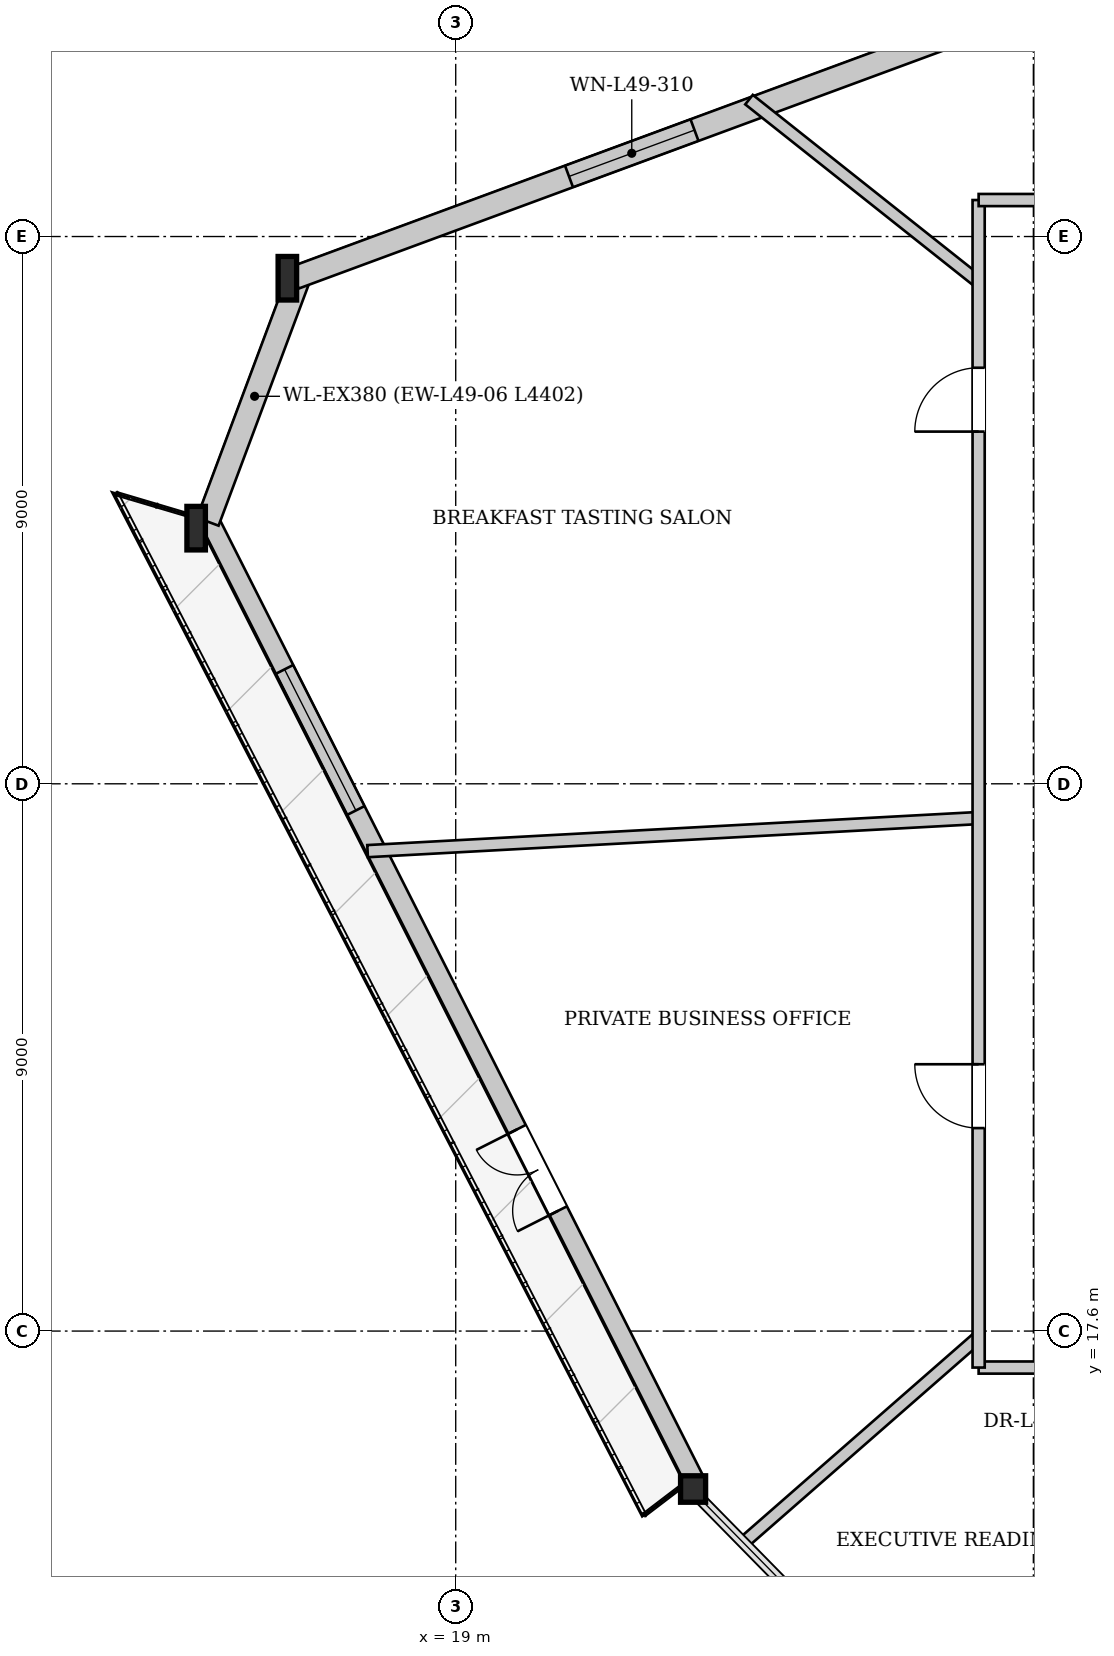
"""IFC4 building model, lengths in metres.
Left out: names, types, materials, properties, quantities, classifications, styles, units other than length and angle.
Written with IfcOpenShell. Run it as: python <this file> out.ifc"""

import sys

from ifc_helpers import new_model, si_unit, direction, frame, frame_2d, origin, origin_2d, place, context, subcontext, project, spatial, rectangle, i_section, extrude, source, transform, mapped, element, fill, save


model = new_model("IFC4")
c1 = context("Model", 3, precision=1e-05, world=origin(), true_north=direction((0.0, 1.0)))
c2 = subcontext(c1, "Body", "Model", "MODEL_VIEW")
j1 = project(units=[si_unit("LENGTHUNIT", "METRE"), si_unit("PLANEANGLEUNIT", "RADIAN")], contexts=[c1])
p1 = place(None, origin())
s1 = spatial("IfcSite", under=j1, at=p1, CompositionType="ELEMENT")
p2 = place(p1, origin())
s2 = spatial("IfcBuilding", under=s1, at=p2, CompositionType="ELEMENT")
p3 = place(p2, frame((0.0, 0.0, 185.65)))
s3 = spatial("IfcBuildingStorey", under=s2, at=p3, CompositionType="ELEMENT", Elevation=185.65)
m1 = source(origin(), c2, "Body", "SweptSolid", [
    extrude(i_section(OverallWidth=0.412, OverallDepth=0.435, WebThickness=0.031, FlangeThickness=0.05, at=origin_2d()), origin(), (0.0, 0.0, 1.0), 3.398),
])
p4 = place(p3, frame((26.94, 39.034, 0.0), z_axis=(-0.051951924281, -0.068694383973, 0.996284135763), x_axis=(0.797590801114, -0.603198900843, 0.0)))
e1 = element("IfcColumn", 1, at=p4, inside=s3, PredefinedType="COLUMN", context=c2, shape_type="MappedRepresentation", body=[
    mapped(m1, transform((0.0, 0.0, 0.0), x_axis=(1.0, 0.0, 0.0), y_axis=(0.0, 1.0, 0.0), z_axis=(0.0, 0.0, 1.0), scale=1.0)),
])
m2 = source(origin(), c2, "Body", "SweptSolid", [
    extrude(i_section(OverallWidth=0.304, OverallDepth=0.716, WebThickness=0.021, FlangeThickness=0.04, at=origin_2d()), origin(), (0.0, 0.0, 1.0), 3.407),
])
p5 = place(p3, frame((16.285, 35.101, 0.0), z_axis=(-0.031742425805, -0.109557943692, 0.993473439694), x_axis=(0.960498006582, -0.278286865216, 0.0)))
e2 = element("IfcColumn", 2, at=p5, inside=s3, PredefinedType="COLUMN", context=c2, shape_type="MappedRepresentation", body=[
    mapped(m2, transform((0.0, 0.0, 0.0), x_axis=(1.0, 0.0, 0.0), y_axis=(0.0, 1.0, 0.0), z_axis=(0.0, 0.0, 1.0), scale=1.0)),
])
m3 = source(origin(), c2, "Body", "SweptSolid", [
    extrude(i_section(OverallWidth=0.304, OverallDepth=0.716, WebThickness=0.021, FlangeThickness=0.04, at=origin_2d()), origin(), (0.0, 0.0, 1.0), 3.403),
])
p6 = place(p3, frame((14.744, 30.978, 0.0), z_axis=(-0.007461607315, -0.101951384567, 0.994761398327), x_axis=(0.997332477554, -0.072992665493, 0.0)))
e3 = element("IfcColumn", 3, at=p6, inside=s3, PredefinedType="COLUMN", context=c2, shape_type="MappedRepresentation", body=[
    mapped(m3, transform((0.0, 0.0, 0.0), x_axis=(1.0, 0.0, 0.0), y_axis=(0.0, 1.0, 0.0), z_axis=(0.0, 0.0, 1.0), scale=1.0)),
])
m4 = source(origin(), c2, "Body", "SweptSolid", [
    extrude(i_section(OverallWidth=0.412, OverallDepth=0.435, WebThickness=0.031, FlangeThickness=0.05, at=origin_2d()), origin(), (0.0, 0.0, 1.0), 3.4),
])
p7 = place(p3, frame((22.775, 15.093, 0.0), z_axis=(0.075836030709, -0.053070858612, 0.995706975175), x_axis=(0.573358197873, 0.819304813199, 0.0)))
e4 = element("IfcColumn", 4, at=p7, inside=s3, PredefinedType="COLUMN", context=c2, shape_type="MappedRepresentation", body=[
    mapped(m4, transform((0.0, 0.0, 0.0), x_axis=(1.0, 0.0, 0.0), y_axis=(0.0, 1.0, 0.0), z_axis=(0.0, 0.0, 1.0), scale=1.0)),
])
p8 = place(p3, frame((22.918, 15.165, 0.0), z_axis=(0.0, 0.0, 1.0), x_axis=(-0.451192327093, 0.892426738714, 0.0)))
e5 = element("IfcWall", 5, at=p8, inside=s3, PredefinedType="SOLIDWALL", context=c2, shape_type="SweptSolid", body=[
    extrude(rectangle(XDim=17.8, YDim=0.32, at=frame_2d((8.9, 0.0))), origin(), (0.0, 0.0, 1.0), 2.722),
])
p9 = place(p8, frame((4.946, 0.0, 0.0)))
e6 = element("IfcOpeningElement", 6, at=p9, cuts=e5, PredefinedType="OPENING", context=c2, shape_type="SweptSolid", body=[
    extrude(rectangle(XDim=1.5, YDim=2.3, at=frame_2d((0.75, 1.15))), frame((0.0, 0.17, 0.0), z_axis=(0.0, -1.0, 0.0), x_axis=(1.0, 0.0, 0.0)), (0.0, 0.0, 1.0), 0.34),
])
p10 = place(p8, frame((12.322, 0.0, 0.252)))
e7 = element("IfcOpeningElement", 7, at=p10, cuts=e5, PredefinedType="OPENING", context=c2, shape_type="SweptSolid", body=[
    extrude(rectangle(XDim=2.6, YDim=2.35, at=frame_2d((1.3, 1.175))), frame((0.0, 0.17, 0.0), z_axis=(0.0, -1.0, 0.0), x_axis=(1.0, 0.0, 0.0)), (0.0, 0.0, 1.0), 0.34),
])
p11 = place(p3, frame((14.922, 30.911, 0.0), z_axis=(0.0, 0.0, 1.0), x_axis=(0.350168907241, 0.936686573194, 0.0)))
e8 = element("IfcWall", 8, at=p11, inside=s3, PredefinedType="SOLIDWALL", context=c2, shape_type="SweptSolid", body=[
    extrude(rectangle(XDim=4.401, YDim=0.38, at=frame_2d((2.201, 0.0))), origin(), (0.0, 0.0, 1.0), 2.722),
])
p12 = place(p3, frame((16.351, 34.922, 0.0), z_axis=(0.0, 0.0, 1.0), x_axis=(0.938118125274, 0.346315438629, 0.0)))
e9 = element("IfcWall", 9, at=p12, inside=s3, PredefinedType="SOLIDWALL", context=c2, shape_type="SweptSolid", body=[
    extrude(rectangle(XDim=22.715, YDim=0.38, at=frame_2d((11.357, 0.0))), origin(), (0.0, 0.0, 1.0), 2.722),
])
p13 = place(p12, frame((4.81, 0.0, 0.352)))
e10 = element("IfcOpeningElement", 10, at=p13, cuts=e9, PredefinedType="OPENING", context=c2, shape_type="SweptSolid", body=[
    extrude(rectangle(XDim=2.2, YDim=2.25, at=frame_2d((1.1, 1.125))), frame((0.0, 0.2, 0.0), z_axis=(0.0, -1.0, 0.0), x_axis=(1.0, 0.0, 0.0)), (0.0, 0.0, 1.0), 0.4),
])
p14 = place(p12, frame((15.255, 0.0, 0.352)))
e11 = element("IfcOpeningElement", 11, at=p14, cuts=e9, PredefinedType="OPENING", context=c2, shape_type="SweptSolid", body=[
    extrude(rectangle(XDim=2.2, YDim=2.25, at=frame_2d((1.1, 1.125))), frame((0.0, 0.2, 0.0), z_axis=(0.0, -1.0, 0.0), x_axis=(1.0, 0.0, 0.0)), (0.0, 0.0, 1.0), 0.4),
])
p15 = place(p3, frame((27.6, 34.854, 0.0), z_axis=(0.0, 0.0, 1.0), x_axis=(-0.783268941763, 0.621683009957, 0.0)))
e12 = element("IfcWall", 12, at=p15, inside=s3, PredefinedType="PARTITIONING", context=c2, shape_type="SweptSolid", body=[
    extrude(rectangle(XDim=4.821, YDim=0.2, at=frame_2d((2.411, 0.0))), origin(), (0.0, 0.0, 1.0), 3.33),
])
p16 = place(p3, frame((27.6, 26.037, 0.0), z_axis=(0.0, 0.0, 1.0), x_axis=(-0.998535764229, -0.054095541001, 0.0)))
e13 = element("IfcWall", 13, at=p16, inside=s3, PredefinedType="PARTITIONING", context=c2, shape_type="SweptSolid", body=[
    extrude(rectangle(XDim=10.064, YDim=0.2, at=frame_2d((5.032, 0.0))), origin(), (0.0, 0.0, 1.0), 3.33),
])
p17 = place(p3, frame((27.6, 17.503, 0.0), z_axis=(0.0, 0.0, 1.0), x_axis=(-0.752689151481, -0.658376063692, 0.0)))
e14 = element("IfcWall", 14, at=p17, inside=s3, PredefinedType="PARTITIONING", context=c2, shape_type="SweptSolid", body=[
    extrude(rectangle(XDim=5.11, YDim=0.2, at=frame_2d((2.555, 0.0))), origin(), (0.0, 0.0, 1.0), 3.33),
])
p18 = place(p3, frame((27.6, 17.0, 0.0), z_axis=(0.0, 0.0, 1.0), x_axis=(1.0, 0.0, 0.0)))
e15 = element("IfcWall", 15, at=p18, inside=s3, PredefinedType="PARTITIONING", context=c2, shape_type="SweptSolid", body=[
    extrude(rectangle(XDim=20.8, YDim=0.2, at=frame_2d((10.4, 0.0))), origin(), (0.0, 0.0, 1.0), 3.33),
])
p19 = place(p18, frame((8.292, 0.0, 0.0)))
e16 = element("IfcOpeningElement", 16, at=p19, cuts=e15, PredefinedType="OPENING", context=c2, shape_type="SweptSolid", body=[
    extrude(rectangle(XDim=1.05, YDim=2.2, at=frame_2d((0.525, 1.1))), frame((0.0, 0.11, 0.0), z_axis=(0.0, -1.0, 0.0), x_axis=(1.0, 0.0, 0.0)), (0.0, 0.0, 1.0), 0.22),
])
p20 = place(p18, frame((15.097, 0.0, 0.0)))
e17 = element("IfcOpeningElement", 17, at=p20, cuts=e15, PredefinedType="OPENING", context=c2, shape_type="SweptSolid", body=[
    extrude(rectangle(XDim=1.05, YDim=2.2, at=frame_2d((0.525, 1.1))), frame((0.0, 0.11, 0.0), z_axis=(0.0, -1.0, 0.0), x_axis=(1.0, 0.0, 0.0)), (0.0, 0.0, 1.0), 0.22),
])
p21 = place(p18, frame((1.25, 0.0, 0.0)))
e18 = element("IfcOpeningElement", 18, at=p21, cuts=e15, PredefinedType="OPENING", context=c2, shape_type="SweptSolid", body=[
    extrude(rectangle(XDim=1.05, YDim=2.2, at=frame_2d((0.525, 1.1))), frame((0.0, 0.11, 0.0), z_axis=(0.0, -1.0, 0.0), x_axis=(1.0, 0.0, 0.0)), (0.0, 0.0, 1.0), 0.22),
])
p22 = place(p3, frame((27.6, 17.0, 0.0), z_axis=(0.0, 0.0, 1.0), x_axis=(0.0, 1.0, 0.0)))
e19 = element("IfcWall", 19, at=p22, inside=s3, PredefinedType="PARTITIONING", context=c2, shape_type="SweptSolid", body=[
    extrude(rectangle(XDim=19.2, YDim=0.2, at=frame_2d((9.6, 0.0))), origin(), (0.0, 0.0, 1.0), 3.33),
])
p23 = place(p22, frame((15.392, 0.0, 0.0)))
e20 = element("IfcOpeningElement", 20, at=p23, cuts=e19, PredefinedType="OPENING", context=c2, shape_type="SweptSolid", body=[
    extrude(rectangle(XDim=1.05, YDim=2.2, at=frame_2d((0.525, 1.1))), frame((0.0, 0.11, 0.0), z_axis=(0.0, -1.0, 0.0), x_axis=(1.0, 0.0, 0.0)), (0.0, 0.0, 1.0), 0.22),
])
p24 = place(p22, frame((3.938, 0.0, 0.0)))
e21 = element("IfcOpeningElement", 21, at=p24, cuts=e19, PredefinedType="OPENING", context=c2, shape_type="SweptSolid", body=[
    extrude(rectangle(XDim=1.05, YDim=2.2, at=frame_2d((0.525, 1.1))), frame((0.0, 0.11, 0.0), z_axis=(0.0, -1.0, 0.0), x_axis=(1.0, 0.0, 0.0)), (0.0, 0.0, 1.0), 0.22),
])
p25 = place(p3, frame((27.6, 36.2, 0.0), z_axis=(0.0, 0.0, 1.0), x_axis=(1.0, 0.0, 0.0)))
e22 = element("IfcWall", 22, at=p25, inside=s3, PredefinedType="PARTITIONING", context=c2, shape_type="SweptSolid", body=[
    extrude(rectangle(XDim=13.4, YDim=0.2, at=frame_2d((6.7, 0.0))), origin(), (0.0, 0.0, 1.0), 3.33),
])
p26 = place(p25, frame((12.05, 0.0, 0.0)))
e23 = element("IfcOpeningElement", 23, at=p26, cuts=e22, PredefinedType="OPENING", context=c2, shape_type="SweptSolid", body=[
    extrude(rectangle(XDim=1.05, YDim=2.2, at=frame_2d((0.525, 1.1))), frame((0.0, 0.11, 0.0), z_axis=(0.0, -1.0, 0.0), x_axis=(1.0, 0.0, 0.0)), (0.0, 0.0, 1.0), 0.22),
])
p27 = place(p25, frame((4.575, 0.0, 0.0)))
e24 = element("IfcOpeningElement", 24, at=p27, cuts=e22, PredefinedType="OPENING", context=c2, shape_type="SweptSolid", body=[
    extrude(rectangle(XDim=1.05, YDim=2.2, at=frame_2d((0.525, 1.1))), frame((0.0, 0.11, 0.0), z_axis=(0.0, -1.0, 0.0), x_axis=(1.0, 0.0, 0.0)), (0.0, 0.0, 1.0), 0.22),
])
m5 = source(origin(), c2, "Body", "SweptSolid", [
    extrude(rectangle(XDim=1.5, YDim=2.3, at=frame_2d((0.75, 1.15))), frame((0.0, 0.025, 0.0), z_axis=(0.0, -1.0, 0.0), x_axis=(1.0, 0.0, 0.0)), (0.0, 0.0, 1.0), 0.05),
])
p28 = place(p9, origin())
e25 = element("IfcDoor", 25, at=p28, inside=s3, OperationType="DOUBLE_DOOR_SINGLE_SWING", PredefinedType="DOOR", context=c2, shape_type="MappedRepresentation", body=[
    mapped(m5, transform((0.0, 0.0, 0.0), x_axis=(1.0, 0.0, 0.0), y_axis=(0.0, 1.0, 0.0), z_axis=(0.0, 0.0, 1.0), scale=1.0)),
])
fill(e6, e25)
m6 = source(origin(), c2, "Body", "SweptSolid", [
    extrude(rectangle(XDim=2.6, YDim=2.35, at=frame_2d((1.3, 1.175))), frame((0.0, 0.03, 0.0), z_axis=(0.0, -1.0, 0.0), x_axis=(1.0, 0.0, 0.0)), (0.0, 0.0, 1.0), 0.06),
])
p29 = place(p10, origin())
e26 = element("IfcWindow", 26, at=p29, inside=s3, PartitioningType="SINGLE_PANEL", PredefinedType="WINDOW", context=c2, shape_type="MappedRepresentation", body=[
    mapped(m6, transform((0.0, 0.0, 0.0), x_axis=(1.0, 0.0, 0.0), y_axis=(0.0, 1.0, 0.0), z_axis=(0.0, 0.0, 1.0), scale=1.0)),
])
fill(e7, e26)
m7 = source(origin(), c2, "Body", "SweptSolid", [
    extrude(rectangle(XDim=2.2, YDim=2.25, at=frame_2d((1.1, 1.125))), frame((0.0, 0.03, 0.0), z_axis=(0.0, -1.0, 0.0), x_axis=(1.0, 0.0, 0.0)), (0.0, 0.0, 1.0), 0.06),
])
p30 = place(p13, origin())
e27 = element("IfcWindow", 27, at=p30, inside=s3, PartitioningType="SINGLE_PANEL", PredefinedType="WINDOW", context=c2, shape_type="MappedRepresentation", body=[
    mapped(m7, transform((0.0, 0.0, 0.0), x_axis=(1.0, 0.0, 0.0), y_axis=(0.0, 1.0, 0.0), z_axis=(0.0, 0.0, 1.0), scale=1.0)),
])
fill(e10, e27)
m8 = source(origin(), c2, "Body", "SweptSolid", [
    extrude(rectangle(XDim=1.05, YDim=2.2, at=frame_2d((0.525, 1.1))), frame((0.0, 0.025, 0.0), z_axis=(0.0, -1.0, 0.0), x_axis=(1.0, 0.0, 0.0)), (0.0, 0.0, 1.0), 0.05),
])
p31 = place(p23, origin())
e28 = element("IfcDoor", 28, at=p31, inside=s3, OperationType="SINGLE_SWING_LEFT", PredefinedType="DOOR", context=c2, shape_type="MappedRepresentation", body=[
    mapped(m8, transform((0.0, 0.0, 0.0), x_axis=(1.0, 0.0, 0.0), y_axis=(0.0, 1.0, 0.0), z_axis=(0.0, 0.0, 1.0), scale=1.0)),
])
fill(e20, e28)
p32 = place(p24, origin())
e29 = element("IfcDoor", 29, at=p32, inside=s3, OperationType="SINGLE_SWING_RIGHT", PredefinedType="DOOR", context=c2, shape_type="MappedRepresentation", body=[
    mapped(m8, transform((0.0, 0.0, 0.0), x_axis=(1.0, 0.0, 0.0), y_axis=(0.0, 1.0, 0.0), z_axis=(0.0, 0.0, 1.0), scale=1.0)),
])
fill(e21, e29)
save(model, sys.argv[1])
